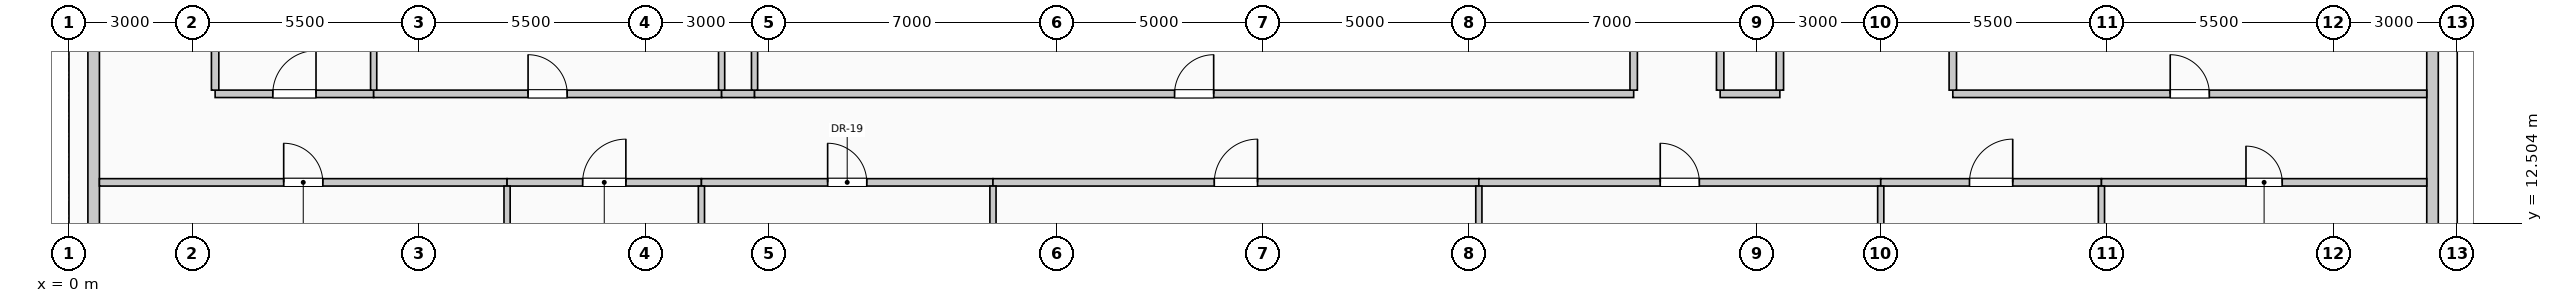
"""IFC4 building model, lengths in metres.
Left out: names, types, materials, properties, quantities, classifications, styles, units other than length and angle.
Written with IfcOpenShell. Run it as: python <this file> out.ifc"""

import sys

from ifc_helpers import new_model, si_unit, direction, frame, frame_2d, origin, place, context, subcontext, project, spatial, rectangle, extrude, element, fill, save


model = new_model("IFC4")
c1 = context("Model", 3, precision=1e-05, world=origin(), true_north=direction((0.0, 1.0)))
c2 = subcontext(c1, "Body", "Model", "MODEL_VIEW")
j1 = project(units=[si_unit("LENGTHUNIT", "METRE"), si_unit("PLANEANGLEUNIT", "RADIAN")], contexts=[c1])
p1 = place(None, origin())
s1 = spatial("IfcSite", under=j1, at=p1, CompositionType="ELEMENT")
p2 = place(p1, origin())
s2 = spatial("IfcBuilding", under=s1, at=p2, CompositionType="ELEMENT")
p3 = place(p2, frame((0.0, 0.0, 128.6)))
s3 = spatial("IfcBuildingStorey", under=s2, at=p3, CompositionType="ELEMENT", Elevation=128.6)
for number, where, z_axis, x_axis in (
    (1, (0.6, 10.445, 0.0), (0.0, 0.0, 1.0), (0.0, 1.0, 0.0)),
    (2, (57.4, 17.555, 0.0), (0.0, 0.0, 1.0), (0.0, -1.0, 0.0)),
):
    element("IfcWall", number, at=place(p3, frame(where, z_axis=z_axis, x_axis=x_axis)), inside=s3, PredefinedType="SOLIDWALL", context=c2, shape_type="SweptSolid", body=[
        extrude(rectangle(XDim=7.11, YDim=0.28, at=frame_2d((3.555, 0.0))), origin(), (0.0, 0.0, 1.0), 2.875),
    ])
p4 = place(p3, frame((0.74, 13.5, 0.0), z_axis=(0.0, 0.0, 1.0), x_axis=(1.0, 0.0, 0.0)))
e3 = element("IfcWall", 3, at=p4, inside=s3, PredefinedType="PARTITIONING", context=c2, shape_type="SweptSolid", body=[
    extrude(rectangle(XDim=9.9, YDim=0.18, at=frame_2d((4.95, 0.0))), origin(), (0.0, 0.0, 1.0), 3.725),
])
p5 = place(p4, frame((4.475, 0.0, 0.0)))
e4 = element("IfcOpeningElement", 4, at=p5, cuts=e3, PredefinedType="OPENING", context=c2, shape_type="SweptSolid", body=[
    extrude(rectangle(XDim=0.95, YDim=2.15, at=frame_2d((0.475, 1.075))), frame((0.0, 0.1, 0.0), z_axis=(0.0, -1.0, 0.0), x_axis=(1.0, 0.0, 0.0)), (0.0, 0.0, 1.0), 0.2),
])
p6 = place(p3, frame((10.64, 13.5, 0.0), z_axis=(0.0, 0.0, 1.0), x_axis=(1.0, 0.0, 0.0)))
e5 = element("IfcWall", 5, at=p6, inside=s3, PredefinedType="PARTITIONING", context=c2, shape_type="SweptSolid", body=[
    extrude(rectangle(XDim=4.72, YDim=0.18, at=frame_2d((2.36, 0.0))), origin(), (0.0, 0.0, 1.0), 3.725),
])
p7 = place(p6, frame((1.835, 0.0, 0.0)))
e6 = element("IfcOpeningElement", 6, at=p7, cuts=e5, PredefinedType="OPENING", context=c2, shape_type="SweptSolid", body=[
    extrude(rectangle(XDim=1.05, YDim=2.15, at=frame_2d((0.525, 1.075))), frame((0.0, 0.1, 0.0), z_axis=(0.0, -1.0, 0.0), x_axis=(1.0, 0.0, 0.0)), (0.0, 0.0, 1.0), 0.2),
])
p8 = place(p3, frame((15.36, 13.5, 0.0), z_axis=(0.0, 0.0, 1.0), x_axis=(1.0, 0.0, 0.0)))
e7 = element("IfcWall", 7, at=p8, inside=s3, PredefinedType="PARTITIONING", context=c2, shape_type="SweptSolid", body=[
    extrude(rectangle(XDim=7.08, YDim=0.18, at=frame_2d((3.54, 0.0))), origin(), (0.0, 0.0, 1.0), 3.725),
])
p9 = place(p8, frame((3.065, 0.0, 0.0)))
e8 = element("IfcOpeningElement", 8, at=p9, cuts=e7, PredefinedType="OPENING", context=c2, shape_type="SweptSolid", body=[
    extrude(rectangle(XDim=0.95, YDim=2.15, at=frame_2d((0.475, 1.075))), frame((0.0, 0.1, 0.0), z_axis=(0.0, -1.0, 0.0), x_axis=(1.0, 0.0, 0.0)), (0.0, 0.0, 1.0), 0.2),
])
p10 = place(p3, frame((22.44, 13.5, 0.0), z_axis=(0.0, 0.0, 1.0), x_axis=(1.0, 0.0, 0.0)))
e9 = element("IfcWall", 9, at=p10, inside=s3, PredefinedType="PARTITIONING", context=c2, shape_type="SweptSolid", body=[
    extrude(rectangle(XDim=11.8, YDim=0.18, at=frame_2d((5.9, 0.0))), origin(), (0.0, 0.0, 1.0), 3.725),
])
p11 = place(p10, frame((5.375, 0.0, 0.0)))
e10 = element("IfcOpeningElement", 10, at=p11, cuts=e9, PredefinedType="OPENING", context=c2, shape_type="SweptSolid", body=[
    extrude(rectangle(XDim=1.05, YDim=2.15, at=frame_2d((0.525, 1.075))), frame((0.0, 0.1, 0.0), z_axis=(0.0, -1.0, 0.0), x_axis=(1.0, 0.0, 0.0)), (0.0, 0.0, 1.0), 0.2),
])
p12 = place(p3, frame((34.24, 13.5, 0.0), z_axis=(0.0, 0.0, 1.0), x_axis=(1.0, 0.0, 0.0)))
e11 = element("IfcWall", 11, at=p12, inside=s3, PredefinedType="PARTITIONING", context=c2, shape_type="SweptSolid", body=[
    extrude(rectangle(XDim=9.76, YDim=0.18, at=frame_2d((4.88, 0.0))), origin(), (0.0, 0.0, 1.0), 3.725),
])
p13 = place(p12, frame((4.405, 0.0, 0.0)))
e12 = element("IfcOpeningElement", 12, at=p13, cuts=e11, PredefinedType="OPENING", context=c2, shape_type="SweptSolid", body=[
    extrude(rectangle(XDim=0.95, YDim=2.15, at=frame_2d((0.475, 1.075))), frame((0.0, 0.1, 0.0), z_axis=(0.0, -1.0, 0.0), x_axis=(1.0, 0.0, 0.0)), (0.0, 0.0, 1.0), 0.2),
])
p14 = place(p3, frame((44.0, 13.5, 0.0), z_axis=(0.0, 0.0, 1.0), x_axis=(1.0, 0.0, 0.0)))
e13 = element("IfcWall", 13, at=p14, inside=s3, PredefinedType="PARTITIONING", context=c2, shape_type="SweptSolid", body=[
    extrude(rectangle(XDim=5.36, YDim=0.18, at=frame_2d((2.68, 0.0))), origin(), (0.0, 0.0, 1.0), 3.725),
])
p15 = place(p14, frame((2.155, 0.0, 0.0)))
e14 = element("IfcOpeningElement", 14, at=p15, cuts=e13, PredefinedType="OPENING", context=c2, shape_type="SweptSolid", body=[
    extrude(rectangle(XDim=1.05, YDim=2.15, at=frame_2d((0.525, 1.075))), frame((0.0, 0.1, 0.0), z_axis=(0.0, -1.0, 0.0), x_axis=(1.0, 0.0, 0.0)), (0.0, 0.0, 1.0), 0.2),
])
p16 = place(p3, frame((49.36, 13.5, 0.0), z_axis=(0.0, 0.0, 1.0), x_axis=(1.0, 0.0, 0.0)))
e15 = element("IfcWall", 15, at=p16, inside=s3, PredefinedType="PARTITIONING", context=c2, shape_type="SweptSolid", body=[
    extrude(rectangle(XDim=7.9, YDim=0.18, at=frame_2d((3.95, 0.0))), origin(), (0.0, 0.0, 1.0), 3.725),
])
p17 = place(p16, frame((3.51, 0.0, 0.0)))
e16 = element("IfcOpeningElement", 16, at=p17, cuts=e15, PredefinedType="OPENING", context=c2, shape_type="SweptSolid", body=[
    extrude(rectangle(XDim=0.88, YDim=2.1, at=frame_2d((0.44, 1.05))), frame((0.0, 0.1, 0.0), z_axis=(0.0, -1.0, 0.0), x_axis=(1.0, 0.0, 0.0)), (0.0, 0.0, 1.0), 0.2),
])
p18 = place(p3, frame((3.55, 15.65, 0.0), z_axis=(0.0, 0.0, 1.0), x_axis=(1.0, 0.0, 0.0)))
e17 = element("IfcWall", 17, at=p18, inside=s3, PredefinedType="PARTITIONING", context=c2, shape_type="SweptSolid", body=[
    extrude(rectangle(XDim=3.85, YDim=0.18, at=frame_2d((1.925, 0.0))), origin(), (0.0, 0.0, 1.0), 3.725),
])
p19 = place(p18, frame((1.4, 0.0, 0.0)))
e18 = element("IfcOpeningElement", 18, at=p19, cuts=e17, PredefinedType="OPENING", context=c2, shape_type="SweptSolid", body=[
    extrude(rectangle(XDim=1.05, YDim=2.15, at=frame_2d((0.525, 1.075))), frame((0.0, 0.1, 0.0), z_axis=(0.0, -1.0, 0.0), x_axis=(1.0, 0.0, 0.0)), (0.0, 0.0, 1.0), 0.2),
])
p20 = place(p3, frame((7.4, 15.65, 0.0), z_axis=(0.0, 0.0, 1.0), x_axis=(1.0, 0.0, 0.0)))
e19 = element("IfcWall", 19, at=p20, inside=s3, PredefinedType="PARTITIONING", context=c2, shape_type="SweptSolid", body=[
    extrude(rectangle(XDim=8.45, YDim=0.18, at=frame_2d((4.225, 0.0))), origin(), (0.0, 0.0, 1.0), 3.725),
])
p21 = place(p20, frame((3.75, 0.0, 0.0)))
e20 = element("IfcOpeningElement", 20, at=p21, cuts=e19, PredefinedType="OPENING", context=c2, shape_type="SweptSolid", body=[
    extrude(rectangle(XDim=0.95, YDim=2.15, at=frame_2d((0.475, 1.075))), frame((0.0, 0.1, 0.0), z_axis=(0.0, -1.0, 0.0), x_axis=(1.0, 0.0, 0.0)), (0.0, 0.0, 1.0), 0.2),
])
p22 = place(p3, frame((15.85, 15.65, 0.0), z_axis=(0.0, 0.0, 1.0), x_axis=(1.0, 0.0, 0.0)))
e21 = element("IfcWall", 21, at=p22, inside=s3, PredefinedType="PARTITIONING", context=c2, shape_type="SweptSolid", body=[
    extrude(rectangle(XDim=0.8, YDim=0.18, at=frame_2d((0.4, 0.0))), origin(), (0.0, 0.0, 1.0), 3.725),
])
p23 = place(p3, frame((16.65, 15.65, 0.0), z_axis=(0.0, 0.0, 1.0), x_axis=(1.0, 0.0, 0.0)))
e22 = element("IfcWall", 22, at=p23, inside=s3, PredefinedType="PARTITIONING", context=c2, shape_type="SweptSolid", body=[
    extrude(rectangle(XDim=21.35, YDim=0.18, at=frame_2d((10.675, 0.0))), origin(), (0.0, 0.0, 1.0), 3.725),
])
p24 = place(p23, frame((10.2, 0.0, 0.0)))
e23 = element("IfcOpeningElement", 23, at=p24, cuts=e22, PredefinedType="OPENING", context=c2, shape_type="SweptSolid", body=[
    extrude(rectangle(XDim=0.95, YDim=2.15, at=frame_2d((0.475, 1.075))), frame((0.0, 0.1, 0.0), z_axis=(0.0, -1.0, 0.0), x_axis=(1.0, 0.0, 0.0)), (0.0, 0.0, 1.0), 0.2),
])
p25 = place(p3, frame((40.1, 15.65, 0.0), z_axis=(0.0, 0.0, 1.0), x_axis=(1.0, 0.0, 0.0)))
e24 = element("IfcWall", 24, at=p25, inside=s3, PredefinedType="PARTITIONING", context=c2, shape_type="SweptSolid", body=[
    extrude(rectangle(XDim=1.45, YDim=0.18, at=frame_2d((0.725, 0.0))), origin(), (0.0, 0.0, 1.0), 3.725),
])
p26 = place(p3, frame((45.75, 15.65, 0.0), z_axis=(0.0, 0.0, 1.0), x_axis=(1.0, 0.0, 0.0)))
e25 = element("IfcWall", 25, at=p26, inside=s3, PredefinedType="PARTITIONING", context=c2, shape_type="SweptSolid", body=[
    extrude(rectangle(XDim=11.51, YDim=0.18, at=frame_2d((5.755, 0.0))), origin(), (0.0, 0.0, 1.0), 3.725),
])
p27 = place(p26, frame((5.28, 0.0, 0.0)))
e26 = element("IfcOpeningElement", 26, at=p27, cuts=e25, PredefinedType="OPENING", context=c2, shape_type="SweptSolid", body=[
    extrude(rectangle(XDim=0.95, YDim=2.15, at=frame_2d((0.475, 1.075))), frame((0.0, 0.1, 0.0), z_axis=(0.0, -1.0, 0.0), x_axis=(1.0, 0.0, 0.0)), (0.0, 0.0, 1.0), 0.2),
])
p28 = place(p3, frame((3.55, 15.74, 0.0), z_axis=(0.0, 0.0, 1.0), x_axis=(0.0, 1.0, 0.0)))
e27 = element("IfcWall", 27, at=p28, inside=s3, PredefinedType="PARTITIONING", context=c2, shape_type="SweptSolid", body=[
    extrude(rectangle(XDim=3.135, YDim=0.18, at=frame_2d((1.567, 0.0))), origin(), (0.0, 0.0, 1.0), 3.725),
])
p29 = place(p3, frame((7.4, 15.74, 0.0), z_axis=(0.0, 0.0, 1.0), x_axis=(0.0, 1.0, 0.0)))
e28 = element("IfcWall", 28, at=p29, inside=s3, PredefinedType="PARTITIONING", context=c2, shape_type="SweptSolid", body=[
    extrude(rectangle(XDim=3.135, YDim=0.15, at=frame_2d((1.567, 0.0))), origin(), (0.0, 0.0, 1.0), 3.725),
])
for number, where, z_axis, x_axis in (
    (29, (10.64, 0.74, 0.0), (0.0, 0.0, 1.0), (0.0, 1.0, 0.0)),
    (30, (15.36, 0.74, 0.0), (0.0, 0.0, 1.0), (0.0, 1.0, 0.0)),
):
    element("IfcWall", number, at=place(p3, frame(where, z_axis=z_axis, x_axis=x_axis)), inside=s3, PredefinedType="PARTITIONING", context=c2, shape_type="SweptSolid", body=[
        extrude(rectangle(XDim=12.67, YDim=0.15, at=frame_2d((6.335, 0.0))), origin(), (0.0, 0.0, 1.0), 3.725),
    ])
p30 = place(p3, frame((15.85, 15.74, 0.0), z_axis=(0.0, 0.0, 1.0), x_axis=(0.0, 1.0, 0.0)))
e31 = element("IfcWall", 31, at=p30, inside=s3, PredefinedType="PARTITIONING", context=c2, shape_type="SweptSolid", body=[
    extrude(rectangle(XDim=1.76, YDim=0.15, at=frame_2d((0.88, 0.0))), origin(), (0.0, 0.0, 1.0), 3.725),
])
p31 = place(p3, frame((16.65, 15.74, 0.0), z_axis=(0.0, 0.0, 1.0), x_axis=(0.0, 1.0, 0.0)))
e32 = element("IfcWall", 32, at=p31, inside=s3, PredefinedType="PARTITIONING", context=c2, shape_type="SweptSolid", body=[
    extrude(rectangle(XDim=1.76, YDim=0.15, at=frame_2d((0.88, 0.0))), origin(), (0.0, 0.0, 1.0), 3.07),
])
p32 = place(p3, frame((22.44, 0.74, 0.0), z_axis=(0.0, 0.0, 1.0), x_axis=(0.0, 1.0, 0.0)))
e33 = element("IfcWall", 33, at=p32, inside=s3, PredefinedType="PARTITIONING", context=c2, shape_type="SweptSolid", body=[
    extrude(rectangle(XDim=12.67, YDim=0.15, at=frame_2d((6.335, 0.0))), origin(), (0.0, 0.0, 1.0), 3.725),
])
p33 = place(p3, frame((34.24, 1.3, 0.0), z_axis=(0.0, 0.0, 1.0), x_axis=(0.0, 1.0, 0.0)))
e34 = element("IfcWall", 34, at=p33, inside=s3, PredefinedType="PARTITIONING", context=c2, shape_type="SweptSolid", body=[
    extrude(rectangle(XDim=12.11, YDim=0.15, at=frame_2d((6.055, 0.0))), origin(), (0.0, 0.0, 1.0), 3.725),
])
p34 = place(p3, frame((38.0, 15.74, 0.0), z_axis=(0.0, 0.0, 1.0), x_axis=(0.0, 1.0, 0.0)))
e35 = element("IfcWall", 35, at=p34, inside=s3, PredefinedType="PARTITIONING", context=c2, shape_type="SweptSolid", body=[
    extrude(rectangle(XDim=10.785, YDim=0.18, at=frame_2d((5.393, 0.0))), origin(), (0.0, 0.0, 1.0), 3.725),
])
p35 = place(p3, frame((40.1, 15.74, 0.0), z_axis=(0.0, 0.0, 1.0), x_axis=(0.0, 1.0, 0.0)))
e36 = element("IfcWall", 36, at=p35, inside=s3, PredefinedType="PARTITIONING", context=c2, shape_type="SweptSolid", body=[
    extrude(rectangle(XDim=12.77, YDim=0.18, at=frame_2d((6.385, 0.0))), origin(), (0.0, 0.0, 1.0), 3.725),
])
p36 = place(p3, frame((41.55, 15.74, 0.0), z_axis=(0.0, 0.0, 1.0), x_axis=(0.0, 1.0, 0.0)))
e37 = element("IfcWall", 37, at=p36, inside=s3, PredefinedType="PARTITIONING", context=c2, shape_type="SweptSolid", body=[
    extrude(rectangle(XDim=1.76, YDim=0.18, at=frame_2d((0.88, 0.0))), origin(), (0.0, 0.0, 1.0), 3.07),
])
p37 = place(p3, frame((44.0, 1.175, 0.0), z_axis=(0.0, 0.0, 1.0), x_axis=(0.0, 1.0, 0.0)))
e38 = element("IfcWall", 38, at=p37, inside=s3, PredefinedType="PARTITIONING", context=c2, shape_type="SweptSolid", body=[
    extrude(rectangle(XDim=12.235, YDim=0.15, at=frame_2d((6.117, 0.0))), origin(), (0.0, 0.0, 1.0), 3.725),
])
p38 = place(p3, frame((45.75, 15.74, 0.0), z_axis=(0.0, 0.0, 1.0), x_axis=(0.0, 1.0, 0.0)))
e39 = element("IfcWall", 39, at=p38, inside=s3, PredefinedType="PARTITIONING", context=c2, shape_type="SweptSolid", body=[
    extrude(rectangle(XDim=8.185, YDim=0.18, at=frame_2d((4.093, 0.0))), origin(), (0.0, 0.0, 1.0), 3.725),
])
p39 = place(p3, frame((49.36, 1.175, 0.0), z_axis=(0.0, 0.0, 1.0), x_axis=(0.0, 1.0, 0.0)))
e40 = element("IfcWall", 40, at=p39, inside=s3, PredefinedType="PARTITIONING", context=c2, shape_type="SweptSolid", body=[
    extrude(rectangle(XDim=12.235, YDim=0.15, at=frame_2d((6.117, 0.0))), origin(), (0.0, 0.0, 1.0), 3.725),
])
p40 = place(p5, origin())
e41 = element("IfcDoor", 41, at=p40, inside=s3, OperationType="SINGLE_SWING_LEFT", PredefinedType="DOOR", context=c2, shape_type="SweptSolid", body=[
    extrude(rectangle(XDim=0.95, YDim=2.15, at=frame_2d((0.475, 1.075))), frame((0.0, 0.025, 0.0), z_axis=(0.0, -1.0, 0.0), x_axis=(1.0, 0.0, 0.0)), (0.0, 0.0, 1.0), 0.05),
])
fill(e4, e41)
p41 = place(p7, origin())
e42 = element("IfcDoor", 42, at=p41, inside=s3, OperationType="SINGLE_SWING_RIGHT", PredefinedType="DOOR", context=c2, shape_type="SweptSolid", body=[
    extrude(rectangle(XDim=1.05, YDim=2.15, at=frame_2d((0.525, 1.075))), frame((0.0, 0.025, 0.0), z_axis=(0.0, -1.0, 0.0), x_axis=(1.0, 0.0, 0.0)), (0.0, 0.0, 1.0), 0.05),
])
fill(e6, e42)
p42 = place(p9, origin())
e43 = element("IfcDoor", 43, at=p42, inside=s3, OperationType="SINGLE_SWING_LEFT", PredefinedType="DOOR", context=c2, shape_type="SweptSolid", body=[
    extrude(rectangle(XDim=0.95, YDim=2.15, at=frame_2d((0.475, 1.075))), frame((0.0, 0.025, 0.0), z_axis=(0.0, -1.0, 0.0), x_axis=(1.0, 0.0, 0.0)), (0.0, 0.0, 1.0), 0.05),
])
fill(e8, e43)
p43 = place(p11, origin())
e44 = element("IfcDoor", 44, at=p43, inside=s3, OperationType="SINGLE_SWING_RIGHT", PredefinedType="DOOR", context=c2, shape_type="SweptSolid", body=[
    extrude(rectangle(XDim=1.05, YDim=2.15, at=frame_2d((0.525, 1.075))), frame((0.0, 0.025, 0.0), z_axis=(0.0, -1.0, 0.0), x_axis=(1.0, 0.0, 0.0)), (0.0, 0.0, 1.0), 0.05),
])
fill(e10, e44)
p44 = place(p13, origin())
e45 = element("IfcDoor", 45, at=p44, inside=s3, OperationType="SINGLE_SWING_LEFT", PredefinedType="DOOR", context=c2, shape_type="SweptSolid", body=[
    extrude(rectangle(XDim=0.95, YDim=2.15, at=frame_2d((0.475, 1.075))), frame((0.0, 0.025, 0.0), z_axis=(0.0, -1.0, 0.0), x_axis=(1.0, 0.0, 0.0)), (0.0, 0.0, 1.0), 0.05),
])
fill(e12, e45)
p45 = place(p15, origin())
e46 = element("IfcDoor", 46, at=p45, inside=s3, OperationType="SINGLE_SWING_RIGHT", PredefinedType="DOOR", context=c2, shape_type="SweptSolid", body=[
    extrude(rectangle(XDim=1.05, YDim=2.15, at=frame_2d((0.525, 1.075))), frame((0.0, 0.025, 0.0), z_axis=(0.0, -1.0, 0.0), x_axis=(1.0, 0.0, 0.0)), (0.0, 0.0, 1.0), 0.05),
])
fill(e14, e46)
p46 = place(p17, origin())
e47 = element("IfcDoor", 47, at=p46, inside=s3, OperationType="SINGLE_SWING_LEFT", PredefinedType="DOOR", context=c2, shape_type="SweptSolid", body=[
    extrude(rectangle(XDim=0.88, YDim=2.1, at=frame_2d((0.44, 1.05))), frame((0.0, 0.025, 0.0), z_axis=(0.0, -1.0, 0.0), x_axis=(1.0, 0.0, 0.0)), (0.0, 0.0, 1.0), 0.05),
])
fill(e16, e47)
p47 = place(p19, origin())
e48 = element("IfcDoor", 48, at=p47, inside=s3, OperationType="SINGLE_SWING_RIGHT", PredefinedType="DOOR", context=c2, shape_type="SweptSolid", body=[
    extrude(rectangle(XDim=1.05, YDim=2.15, at=frame_2d((0.525, 1.075))), frame((0.0, 0.025, 0.0), z_axis=(0.0, -1.0, 0.0), x_axis=(1.0, 0.0, 0.0)), (0.0, 0.0, 1.0), 0.05),
])
fill(e18, e48)
p48 = place(p21, origin())
e49 = element("IfcDoor", 49, at=p48, inside=s3, OperationType="SINGLE_SWING_LEFT", PredefinedType="DOOR", context=c2, shape_type="SweptSolid", body=[
    extrude(rectangle(XDim=0.95, YDim=2.15, at=frame_2d((0.475, 1.075))), frame((0.0, 0.025, 0.0), z_axis=(0.0, -1.0, 0.0), x_axis=(1.0, 0.0, 0.0)), (0.0, 0.0, 1.0), 0.05),
])
fill(e20, e49)
p49 = place(p24, origin())
e50 = element("IfcDoor", 50, at=p49, inside=s3, OperationType="SINGLE_SWING_RIGHT", PredefinedType="DOOR", context=c2, shape_type="SweptSolid", body=[
    extrude(rectangle(XDim=0.95, YDim=2.15, at=frame_2d((0.475, 1.075))), frame((0.0, 0.025, 0.0), z_axis=(0.0, -1.0, 0.0), x_axis=(1.0, 0.0, 0.0)), (0.0, 0.0, 1.0), 0.05),
])
fill(e23, e50)
p50 = place(p27, origin())
e51 = element("IfcDoor", 51, at=p50, inside=s3, OperationType="SINGLE_SWING_LEFT", PredefinedType="DOOR", context=c2, shape_type="SweptSolid", body=[
    extrude(rectangle(XDim=0.95, YDim=2.15, at=frame_2d((0.475, 1.075))), frame((0.0, 0.025, 0.0), z_axis=(0.0, -1.0, 0.0), x_axis=(1.0, 0.0, 0.0)), (0.0, 0.0, 1.0), 0.05),
])
fill(e26, e51)
save(model, sys.argv[1])
